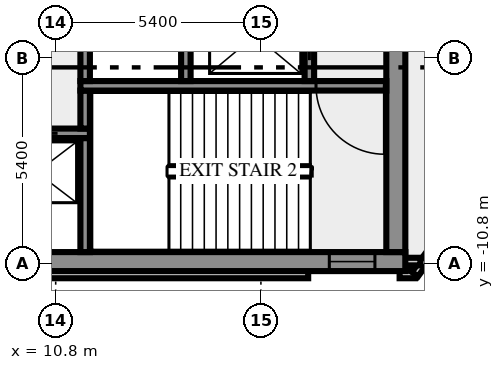
"""IFC4 building model, lengths in metres.
Left out: names, types, materials, properties, quantities, classifications, styles, units other than length and angle.
Written with IfcOpenShell. Run it as: python <this file> out.ifc"""

import sys

from ifc_helpers import new_model, si_unit, direction, frame, frame_2d, origin, place, context, subcontext, project, spatial, rectangle, extrude, element, fill, save


model = new_model("IFC4")
c1 = context("Model", 3, precision=1e-05, world=origin(), true_north=direction((0.0, 1.0)))
c2 = subcontext(c1, "Body", "Model", "MODEL_VIEW")
j1 = project(units=[si_unit("LENGTHUNIT", "METRE"), si_unit("PLANEANGLEUNIT", "RADIAN")], contexts=[c1])
p1 = place(None, origin())
s1 = spatial("IfcSite", under=j1, at=p1, CompositionType="ELEMENT")
p2 = place(p1, origin())
s2 = spatial("IfcBuilding", under=s1, at=p2, CompositionType="ELEMENT")
p3 = place(p2, frame((0.0, 0.0, 194.0)))
s3 = spatial("IfcBuildingStorey", under=s2, at=p3, CompositionType="ELEMENT", Elevation=194.0)
p4 = place(p3, frame((-17.444, -11.088, 0.0), z_axis=(0.0, 0.0, 1.0), x_axis=(1.0, 0.0, 0.0)))
e1 = element("IfcWall", 1, at=p4, inside=s3, PredefinedType="SOLIDWALL", context=c2, shape_type="SweptSolid", body=[
    extrude(rectangle(XDim=34.888, YDim=0.2, at=frame_2d((17.444, 0.0))), origin(), (0.0, 0.0, 1.0), 3.65),
])
p5 = place(p3, frame((19.85, -11.088, 0.0), z_axis=(0.0, 0.0, 1.0), x_axis=(1.0, 0.0, 0.0)))
e2 = element("IfcWall", 2, at=p5, inside=s3, PredefinedType="SOLIDWALL", context=c2, shape_type="SweptSolid", body=[
    extrude(rectangle(XDim=0.406, YDim=0.2, at=frame_2d((0.203, 0.0))), origin(), (0.0, 0.0, 1.0), 3.65),
])
p6 = place(p3, frame((20.253, -11.083, 0.0), z_axis=(0.0, 0.0, 1.0), x_axis=(0.587766567315, 0.809030569476, 0.0)))
e3 = element("IfcWall", 3, at=p6, inside=s3, PredefinedType="SOLIDWALL", context=c2, shape_type="SweptSolid", body=[
    extrude(rectangle(XDim=2.688, YDim=0.2, at=frame_2d((1.344, 0.0))), origin(), (0.0, 0.0, 1.0), 3.65),
])
p7 = place(p3, frame((19.98, -10.75, 0.0), z_axis=(0.0, 0.0, 1.0), x_axis=(1.0, 0.0, 0.0)))
e4 = element("IfcWall", 4, at=p7, inside=s3, PredefinedType="SOLIDWALL", context=c2, shape_type="SweptSolid", body=[
    extrude(rectangle(XDim=0.417, YDim=0.2, at=frame_2d((0.208, 0.0))), origin(), (0.0, 0.0, 1.0), 3.65),
])
p8 = place(p3, frame((-20.0, -10.75, 0.0), z_axis=(0.0, 0.0, 1.0), x_axis=(1.0, 0.0, 0.0)))
e5 = element("IfcWall", 5, at=p8, inside=s3, PredefinedType="SHEAR", context=c2, shape_type="SweptSolid", body=[
    extrude(rectangle(XDim=40.0, YDim=0.5, at=frame_2d((20.0, 0.0))), origin(), (0.0, 0.0, 1.0), 3.65),
])
p9 = place(p8, frame((0.8, 0.0, 1.0)))
e6 = element("IfcOpeningElement", 6, at=p9, cuts=e5, PredefinedType="OPENING", context=c2, shape_type="SweptSolid", body=[
    extrude(rectangle(XDim=1.2, YDim=1.2, at=frame_2d((0.6, 0.6))), frame((0.0, 0.26, 0.0), z_axis=(0.0, -1.0, 0.0), x_axis=(1.0, 0.0, 0.0)), (0.0, 0.0, 1.0), 0.52),
])
p10 = place(p8, frame((38.0, 0.0, 1.0)))
e7 = element("IfcOpeningElement", 7, at=p10, cuts=e5, PredefinedType="OPENING", context=c2, shape_type="SweptSolid", body=[
    extrude(rectangle(XDim=1.2, YDim=1.2, at=frame_2d((0.6, 0.6))), frame((0.0, 0.26, 0.0), z_axis=(0.0, -1.0, 0.0), x_axis=(1.0, 0.0, 0.0)), (0.0, 0.0, 1.0), 0.52),
])
p11 = place(p3, frame((11.575, -10.5, 0.0), z_axis=(0.0, 0.0, 1.0), x_axis=(0.0, 1.0, 0.0)))
e8 = element("IfcWall", 8, at=p11, inside=s3, PredefinedType="SHEAR", context=c2, shape_type="SweptSolid", body=[
    extrude(rectangle(XDim=3.0, YDim=0.25, at=frame_2d((1.5, 0.0))), origin(), (0.0, 0.0, 1.0), 3.65),
])
p12 = place(p3, frame((19.75, -10.5, 0.0), z_axis=(0.0, 0.0, 1.0), x_axis=(0.0, 1.0, 0.0)))
e9 = element("IfcWall", 9, at=p12, inside=s3, PredefinedType="SHEAR", context=c2, shape_type="SweptSolid", body=[
    extrude(rectangle(XDim=8.8, YDim=0.5, at=frame_2d((4.4, 0.0))), origin(), (0.0, 0.0, 1.0), 3.65),
])
p13 = place(p3, frame((11.7, -7.375, 0.0), z_axis=(0.0, 0.0, 1.0), x_axis=(-1.0, 0.0, 0.0)))
e10 = element("IfcWall", 10, at=p13, inside=s3, PredefinedType="SHEAR", context=c2, shape_type="SweptSolid", body=[
    extrude(rectangle(XDim=23.4, YDim=0.25, at=frame_2d((11.7, 0.0))), origin(), (0.0, 0.0, 1.0), 3.65),
])
p14 = place(p13, frame((22.012, 0.0, 0.0)))
e11 = element("IfcOpeningElement", 11, at=p14, cuts=e10, PredefinedType="OPENING", context=c2, shape_type="SweptSolid", body=[
    extrude(rectangle(XDim=0.9, YDim=2.1, at=frame_2d((0.45, 1.05))), frame((0.0, 0.135, 0.0), z_axis=(0.0, -1.0, 0.0), x_axis=(1.0, 0.0, 0.0)), (0.0, 0.0, 1.0), 0.27),
])
p15 = place(p13, frame((20.25, 0.0, 0.0)))
e12 = element("IfcOpeningElement", 12, at=p15, cuts=e10, PredefinedType="OPENING", context=c2, shape_type="SweptSolid", body=[
    extrude(rectangle(XDim=0.9, YDim=2.1, at=frame_2d((0.45, 1.05))), frame((0.0, 0.135, 0.0), z_axis=(0.0, -1.0, 0.0), x_axis=(1.0, 0.0, 0.0)), (0.0, 0.0, 1.0), 0.27),
])
p16 = place(p13, frame((18.25, 0.0, 0.0)))
e13 = element("IfcOpeningElement", 13, at=p16, cuts=e10, PredefinedType="OPENING", context=c2, shape_type="SweptSolid", body=[
    extrude(rectangle(XDim=0.9, YDim=2.1, at=frame_2d((0.45, 1.05))), frame((0.0, 0.135, 0.0), z_axis=(0.0, -1.0, 0.0), x_axis=(1.0, 0.0, 0.0)), (0.0, 0.0, 1.0), 0.27),
])
p17 = place(p13, frame((16.287, 0.0, 0.0)))
e14 = element("IfcOpeningElement", 14, at=p17, cuts=e10, PredefinedType="OPENING", context=c2, shape_type="SweptSolid", body=[
    extrude(rectangle(XDim=0.9, YDim=2.1, at=frame_2d((0.45, 1.05))), frame((0.0, 0.135, 0.0), z_axis=(0.0, -1.0, 0.0), x_axis=(1.0, 0.0, 0.0)), (0.0, 0.0, 1.0), 0.27),
])
p18 = place(p13, frame((14.25, 0.0, 0.0)))
e15 = element("IfcOpeningElement", 15, at=p18, cuts=e10, PredefinedType="OPENING", context=c2, shape_type="SweptSolid", body=[
    extrude(rectangle(XDim=0.9, YDim=2.1, at=frame_2d((0.45, 1.05))), frame((0.0, 0.135, 0.0), z_axis=(0.0, -1.0, 0.0), x_axis=(1.0, 0.0, 0.0)), (0.0, 0.0, 1.0), 0.27),
])
p19 = place(p13, frame((12.125, 0.0, 0.0)))
e16 = element("IfcOpeningElement", 16, at=p19, cuts=e10, PredefinedType="OPENING", context=c2, shape_type="SweptSolid", body=[
    extrude(rectangle(XDim=0.9, YDim=2.1, at=frame_2d((0.45, 1.05))), frame((0.0, 0.135, 0.0), z_axis=(0.0, -1.0, 0.0), x_axis=(1.0, 0.0, 0.0)), (0.0, 0.0, 1.0), 0.27),
])
p20 = place(p13, frame((10.45, 0.0, 0.0)))
e17 = element("IfcOpeningElement", 17, at=p20, cuts=e10, PredefinedType="OPENING", context=c2, shape_type="SweptSolid", body=[
    extrude(rectangle(XDim=0.75, YDim=2.1, at=frame_2d((0.375, 1.05))), frame((0.0, 0.135, 0.0), z_axis=(0.0, -1.0, 0.0), x_axis=(1.0, 0.0, 0.0)), (0.0, 0.0, 1.0), 0.27),
])
p21 = place(p13, frame((8.35, 0.0, 0.0)))
e18 = element("IfcOpeningElement", 18, at=p21, cuts=e10, PredefinedType="OPENING", context=c2, shape_type="SweptSolid", body=[
    extrude(rectangle(XDim=1.1, YDim=2.1, at=frame_2d((0.55, 1.05))), frame((0.0, 0.135, 0.0), z_axis=(0.0, -1.0, 0.0), x_axis=(1.0, 0.0, 0.0)), (0.0, 0.0, 1.0), 0.27),
])
p22 = place(p13, frame((5.85, 0.0, 0.0)))
e19 = element("IfcOpeningElement", 19, at=p22, cuts=e10, PredefinedType="OPENING", context=c2, shape_type="SweptSolid", body=[
    extrude(rectangle(XDim=1.1, YDim=2.1, at=frame_2d((0.55, 1.05))), frame((0.0, 0.135, 0.0), z_axis=(0.0, -1.0, 0.0), x_axis=(1.0, 0.0, 0.0)), (0.0, 0.0, 1.0), 0.27),
])
p23 = place(p13, frame((3.35, 0.0, 0.0)))
e20 = element("IfcOpeningElement", 20, at=p23, cuts=e10, PredefinedType="OPENING", context=c2, shape_type="SweptSolid", body=[
    extrude(rectangle(XDim=1.1, YDim=2.1, at=frame_2d((0.55, 1.05))), frame((0.0, 0.135, 0.0), z_axis=(0.0, -1.0, 0.0), x_axis=(1.0, 0.0, 0.0)), (0.0, 0.0, 1.0), 0.27),
])
p24 = place(p13, frame((0.85, 0.0, 0.0)))
e21 = element("IfcOpeningElement", 21, at=p24, cuts=e10, PredefinedType="OPENING", context=c2, shape_type="SweptSolid", body=[
    extrude(rectangle(XDim=1.1, YDim=2.1, at=frame_2d((0.55, 1.05))), frame((0.0, 0.135, 0.0), z_axis=(0.0, -1.0, 0.0), x_axis=(1.0, 0.0, 0.0)), (0.0, 0.0, 1.0), 0.27),
])
p25 = place(p3, frame((11.575, -7.25, 0.0), z_axis=(0.0, 0.0, 1.0), x_axis=(0.0, 1.0, 0.0)))
e22 = element("IfcWall", 22, at=p25, inside=s3, PredefinedType="SHEAR", context=c2, shape_type="SweptSolid", body=[
    extrude(rectangle(XDim=1.0, YDim=0.25, at=frame_2d((0.5, 0.0))), origin(), (0.0, 0.0, 1.0), 3.65),
])
p26 = place(p3, frame((19.5, -6.125, 0.0), z_axis=(0.0, 0.0, 1.0), x_axis=(-1.0, 0.0, 0.0)))
e23 = element("IfcWall", 23, at=p26, inside=s3, PredefinedType="SHEAR", context=c2, shape_type="SweptSolid", body=[
    extrude(rectangle(XDim=8.05, YDim=0.25, at=frame_2d((4.025, 0.0))), origin(), (0.0, 0.0, 1.0), 3.65),
])
p27 = place(p26, frame((0.05, 0.0, 0.0)))
e24 = element("IfcOpeningElement", 24, at=p27, cuts=e23, PredefinedType="OPENING", context=c2, shape_type="SweptSolid", body=[
    extrude(rectangle(XDim=1.8, YDim=2.1, at=frame_2d((0.9, 1.05))), frame((0.0, 0.135, 0.0), z_axis=(0.0, -1.0, 0.0), x_axis=(1.0, 0.0, 0.0)), (0.0, 0.0, 1.0), 0.27),
])
p28 = place(p3, frame((11.575, -6.0, 0.0), z_axis=(0.0, 0.0, 1.0), x_axis=(0.0, 1.0, 0.0)))
e25 = element("IfcWall", 25, at=p28, inside=s3, PredefinedType="SHEAR", context=c2, shape_type="SweptSolid", body=[
    extrude(rectangle(XDim=1.75, YDim=0.25, at=frame_2d((0.875, 0.0))), origin(), (0.0, 0.0, 1.0), 3.65),
])
p29 = place(p3, frame((14.225, -6.0, 0.0), z_axis=(0.0, 0.0, 1.0), x_axis=(0.0, 1.0, 0.0)))
e26 = element("IfcWall", 26, at=p29, inside=s3, PredefinedType="SHEAR", context=c2, shape_type="SweptSolid", body=[
    extrude(rectangle(XDim=4.3, YDim=0.25, at=frame_2d((2.15, 0.0))), origin(), (0.0, 0.0, 1.0), 3.65),
])
p30 = place(p3, frame((17.475, -6.0, 0.0), z_axis=(0.0, 0.0, 1.0), x_axis=(0.0, 1.0, 0.0)))
e27 = element("IfcWall", 27, at=p30, inside=s3, PredefinedType="SHEAR", context=c2, shape_type="SweptSolid", body=[
    extrude(rectangle(XDim=4.3, YDim=0.25, at=frame_2d((2.15, 0.0))), origin(), (0.0, 0.0, 1.0), 3.65),
])
p31 = place(p30, frame((0.55, 0.0, 0.0)))
e28 = element("IfcOpeningElement", 28, at=p31, cuts=e27, PredefinedType="OPENING", context=c2, shape_type="SweptSolid", body=[
    extrude(rectangle(XDim=1.3, YDim=2.1, at=frame_2d((0.65, 1.05))), frame((0.0, 0.135, 0.0), z_axis=(0.0, -1.0, 0.0), x_axis=(1.0, 0.0, 0.0)), (0.0, 0.0, 1.0), 0.27),
])
p32 = place(p10, origin())
e29 = element("IfcWindow", 29, at=p32, inside=s3, PartitioningType="SINGLE_PANEL", PredefinedType="WINDOW", context=c2, shape_type="SweptSolid", body=[
    extrude(rectangle(XDim=1.2, YDim=1.2, at=frame_2d((0.6, 0.6))), frame((0.0, 0.03, 0.0), z_axis=(0.0, -1.0, 0.0), x_axis=(1.0, 0.0, 0.0)), (0.0, 0.0, 1.0), 0.06),
])
fill(e7, e29)
p33 = place(p24, origin())
e30 = element("IfcDoor", 30, at=p33, inside=s3, OperationType="DOUBLE_DOOR_SLIDING", PredefinedType="DOOR", context=c2, shape_type="SweptSolid", body=[
    extrude(rectangle(XDim=1.1, YDim=2.1, at=frame_2d((0.55, 1.05))), frame((0.0, 0.025, 0.0), z_axis=(0.0, -1.0, 0.0), x_axis=(1.0, 0.0, 0.0)), (0.0, 0.0, 1.0), 0.05),
])
fill(e21, e30)
p34 = place(p27, origin())
e31 = element("IfcDoor", 31, at=p34, inside=s3, OperationType="DOUBLE_DOOR_SINGLE_SWING", PredefinedType="DOOR", context=c2, shape_type="SweptSolid", body=[
    extrude(rectangle(XDim=1.8, YDim=2.1, at=frame_2d((0.9, 1.05))), frame((0.0, 0.025, 0.0), z_axis=(0.0, -1.0, 0.0), x_axis=(1.0, 0.0, 0.0)), (0.0, 0.0, 1.0), 0.05),
])
fill(e24, e31)
p35 = place(p31, origin())
e32 = element("IfcDoor", 32, at=p35, inside=s3, OperationType="DOUBLE_DOOR_SLIDING", PredefinedType="DOOR", context=c2, shape_type="SweptSolid", body=[
    extrude(rectangle(XDim=1.3, YDim=2.1, at=frame_2d((0.65, 1.05))), frame((0.0, 0.025, 0.0), z_axis=(0.0, -1.0, 0.0), x_axis=(1.0, 0.0, 0.0)), (0.0, 0.0, 1.0), 0.05),
])
fill(e28, e32)
save(model, sys.argv[1])
